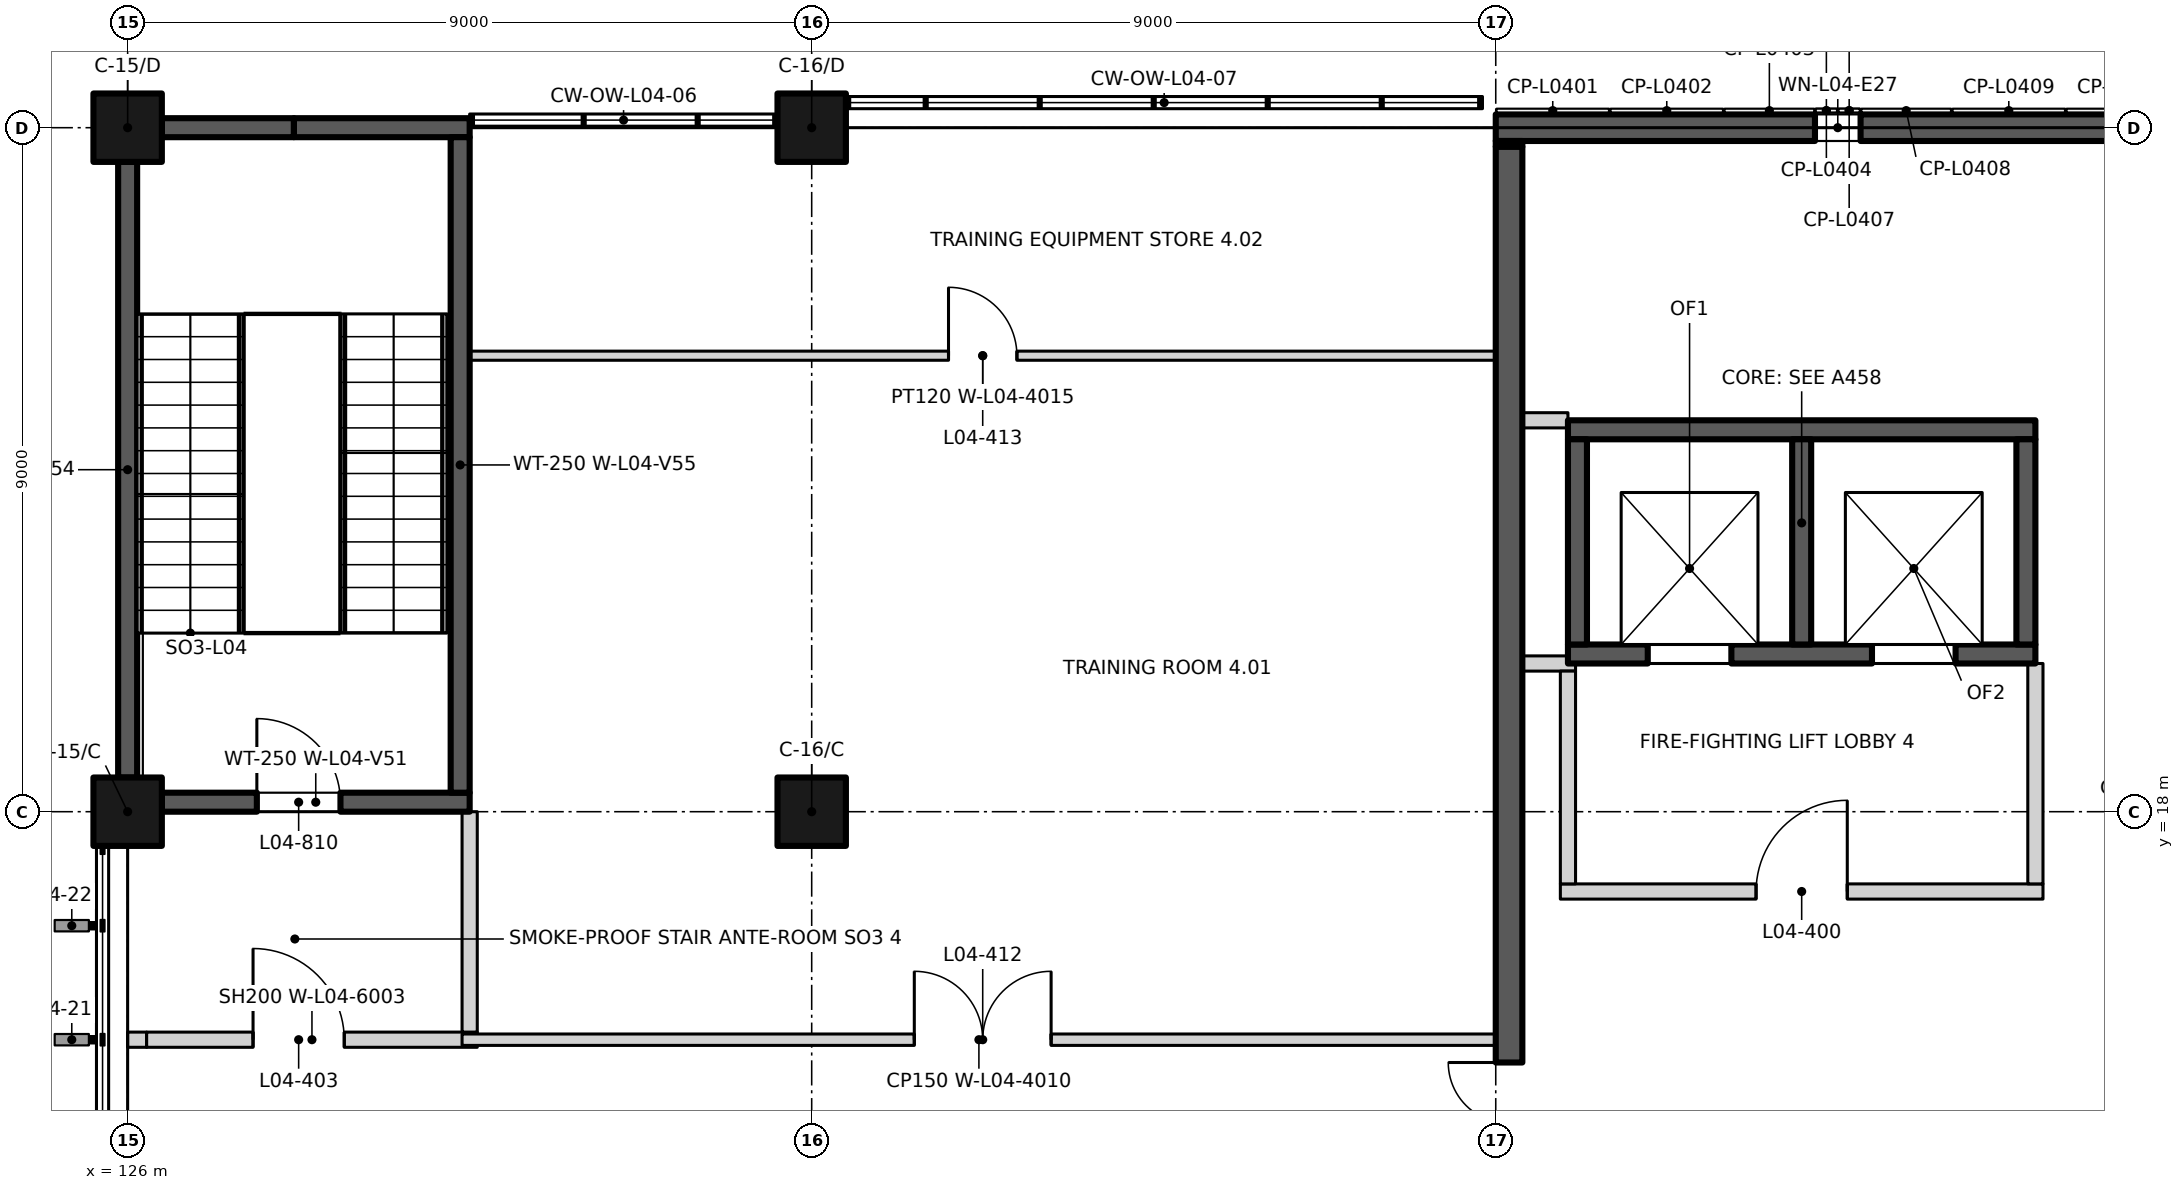
"""IFC4 building model, lengths in metres.
Left out: names, types, materials, properties, quantities, classifications, styles, units other than length and angle.
Written with IfcOpenShell. Run it as: python <this file> out.ifc"""

import sys

from ifc_helpers import new_model, si_unit, direction, frame, frame_2d, origin, origin_2d, place, context, subcontext, project, spatial, rectangle, extrude, element, fill, save


model = new_model("IFC4")
c1 = context("Model", 3, precision=1e-05, world=origin(), true_north=direction((0.0, 1.0)))
c2 = subcontext(c1, "Body", "Model", "MODEL_VIEW")
j1 = project(units=[si_unit("LENGTHUNIT", "METRE"), si_unit("PLANEANGLEUNIT", "RADIAN")], contexts=[c1])
p1 = place(None, origin())
s1 = spatial("IfcSite", under=j1, at=p1, CompositionType="ELEMENT")
p2 = place(p1, origin())
s2 = spatial("IfcBuilding", under=s1, at=p2, CompositionType="ELEMENT")
p3 = place(p2, frame((0.0, 0.0, 19.5)))
s3 = spatial("IfcBuildingStorey", under=s2, at=p3, CompositionType="ELEMENT", Elevation=19.5)
for number, where, z_axis, x_axis in (
    (1, (126.0, 18.0, 0.0), (0.0, 0.0, 1.0), (1.0, 0.0, 0.0)),
    (2, (135.0, 18.0, 0.0), (0.0, 0.0, 1.0), (1.0, 0.0, 0.0)),
    (3, (126.0, 27.0, 0.0), (0.0, 0.0, 1.0), (1.0, 0.0, 0.0)),
    (4, (135.0, 27.0, 0.0), (0.0, 0.0, 1.0), (1.0, 0.0, 0.0)),
):
    element("IfcColumn", number, at=place(p3, frame(where, z_axis=z_axis, x_axis=x_axis)), inside=s3, PredefinedType="COLUMN", context=c2, shape_type="SweptSolid", body=[
        extrude(rectangle(XDim=0.9, YDim=0.9, at=origin_2d()), origin(), (0.0, 0.0, 1.0), 4.5),
    ])
p4 = place(p3, frame((126.45, 18.125, 0.0), z_axis=(0.0, 0.0, 1.0), x_axis=(1.0, 0.0, 0.0)))
e5 = element("IfcWall", 5, at=p4, inside=s3, PredefinedType="SHEAR", context=c2, shape_type="SweptSolid", body=[
    extrude(rectangle(XDim=4.05, YDim=0.25, at=frame_2d((2.025, 0.0))), origin(), (0.0, 0.0, 1.0), 4.5),
])
p5 = place(p4, frame((1.25, 0.0, 0.0)))
e6 = element("IfcOpeningElement", 6, at=p5, cuts=e5, PredefinedType="OPENING", context=c2, shape_type="SweptSolid", body=[
    extrude(rectangle(XDim=1.1, YDim=2.1, at=frame_2d((0.55, 1.05))), frame((0.0, 0.135, 0.0), z_axis=(0.0, -1.0, 0.0), x_axis=(1.0, 0.0, 0.0)), (0.0, 0.0, 1.0), 0.27),
])
p6 = place(p3, frame((126.45, 27.0, 0.0), z_axis=(0.0, 0.0, 1.0), x_axis=(1.0, 0.0, 0.0)))
e7 = element("IfcWall", 7, at=p6, inside=s3, PredefinedType="SHEAR", context=c2, shape_type="SweptSolid", body=[
    extrude(rectangle(XDim=1.738, YDim=0.25, at=frame_2d((0.869, 0.0))), origin(), (0.0, 0.0, 1.0), 4.5),
])
p7 = place(p3, frame((128.188, 27.0, 0.0), z_axis=(0.0, 0.0, 1.0), x_axis=(1.0, 0.0, 0.0)))
e8 = element("IfcWall", 8, at=p7, inside=s3, PredefinedType="SHEAR", context=c2, shape_type="SweptSolid", body=[
    extrude(rectangle(XDim=2.312, YDim=0.25, at=frame_2d((1.156, 0.0))), origin(), (0.0, 0.0, 1.0), 4.5),
])
p8 = place(p3, frame((126.0, 18.45, 0.0), z_axis=(0.0, 0.0, 1.0), x_axis=(0.0, 1.0, 0.0)))
e9 = element("IfcWall", 9, at=p8, inside=s3, PredefinedType="SHEAR", context=c2, shape_type="SweptSolid", body=[
    extrude(rectangle(XDim=8.1, YDim=0.25, at=frame_2d((4.05, 0.0))), origin(), (0.0, 0.0, 1.0), 4.5),
])
p9 = place(p3, frame((130.375, 18.25, 0.0), z_axis=(0.0, 0.0, 1.0), x_axis=(0.0, 1.0, 0.0)))
e10 = element("IfcWall", 10, at=p9, inside=s3, PredefinedType="SHEAR", context=c2, shape_type="SweptSolid", body=[
    extrude(rectangle(XDim=8.625, YDim=0.25, at=frame_2d((4.312, 0.0))), origin(), (0.0, 0.0, 1.0), 4.5),
])
p10 = place(p3, frame((144.95, 20.075, 0.0), z_axis=(0.0, 0.0, 1.0), x_axis=(1.0, 0.0, 0.0)))
e11 = element("IfcWall", 11, at=p10, inside=s3, PredefinedType="SHEAR", context=c2, shape_type="SweptSolid", body=[
    extrude(rectangle(XDim=6.15, YDim=0.25, at=frame_2d((3.075, 0.0))), origin(), (0.0, 0.0, 1.0), 4.5),
])
p11 = place(p10, frame((1.05, 0.0, 0.0)))
e12 = element("IfcOpeningElement", 12, at=p11, cuts=e11, PredefinedType="OPENING", context=c2, shape_type="SweptSolid", body=[
    extrude(rectangle(XDim=1.1, YDim=2.1, at=frame_2d((0.55, 1.05))), frame((0.0, 0.135, 0.0), z_axis=(0.0, -1.0, 0.0), x_axis=(1.0, 0.0, 0.0)), (0.0, 0.0, 1.0), 0.27),
])
p12 = place(p10, frame((4.0, 0.0, 0.0)))
e13 = element("IfcOpeningElement", 13, at=p12, cuts=e11, PredefinedType="OPENING", context=c2, shape_type="SweptSolid", body=[
    extrude(rectangle(XDim=1.1, YDim=2.1, at=frame_2d((0.55, 1.05))), frame((0.0, 0.135, 0.0), z_axis=(0.0, -1.0, 0.0), x_axis=(1.0, 0.0, 0.0)), (0.0, 0.0, 1.0), 0.27),
])
p13 = place(p3, frame((144.95, 23.025, 0.0), z_axis=(0.0, 0.0, 1.0), x_axis=(1.0, 0.0, 0.0)))
e14 = element("IfcWall", 14, at=p13, inside=s3, PredefinedType="SHEAR", context=c2, shape_type="SweptSolid", body=[
    extrude(rectangle(XDim=6.15, YDim=0.25, at=frame_2d((3.075, 0.0))), origin(), (0.0, 0.0, 1.0), 4.5),
])
for number, where, z_axis, x_axis in (
    (15, (145.075, 20.2, 0.0), (0.0, 0.0, 1.0), (0.0, 1.0, 0.0)),
    (16, (148.025, 20.2, 0.0), (0.0, 0.0, 1.0), (0.0, 1.0, 0.0)),
    (17, (150.975, 20.2, 0.0), (0.0, 0.0, 1.0), (0.0, 1.0, 0.0)),
):
    element("IfcWall", number, at=place(p3, frame(where, z_axis=z_axis, x_axis=x_axis)), inside=s3, PredefinedType="SHEAR", context=c2, shape_type="SweptSolid", body=[
        extrude(rectangle(XDim=2.7, YDim=0.25, at=frame_2d((1.35, 0.0))), origin(), (0.0, 0.0, 1.0), 4.5),
    ])
p14 = place(p3, frame((144.0, 27.0, 0.0), z_axis=(0.0, 0.0, 1.0), x_axis=(1.0, 0.0, 0.0)))
e18 = element("IfcWall", 18, at=p14, inside=s3, PredefinedType="SOLIDWALL", context=c2, shape_type="SweptSolid", body=[
    extrude(rectangle(XDim=18.0, YDim=0.35, at=frame_2d((9.0, 0.0))), origin(), (0.0, 0.0, 1.0), 3.6),
])
p15 = place(p14, frame((4.2, 0.0, 0.6)))
e19 = element("IfcOpeningElement", 19, at=p15, cuts=e18, PredefinedType="OPENING", context=c2, shape_type="SweptSolid", body=[
    extrude(rectangle(XDim=0.6, YDim=2.4, at=frame_2d((0.3, 1.2))), frame((0.0, 0.185, 0.0), z_axis=(0.0, -1.0, 0.0), x_axis=(1.0, 0.0, 0.0)), (0.0, 0.0, 1.0), 0.37),
])
p16 = place(p14, frame((13.2, 0.0, 0.6)))
e20 = element("IfcOpeningElement", 20, at=p16, cuts=e18, PredefinedType="OPENING", context=c2, shape_type="SweptSolid", body=[
    extrude(rectangle(XDim=0.6, YDim=2.4, at=frame_2d((0.3, 1.2))), frame((0.0, 0.185, 0.0), z_axis=(0.0, -1.0, 0.0), x_axis=(1.0, 0.0, 0.0)), (0.0, 0.0, 1.0), 0.37),
])
p17 = place(p3, frame((126.0, 15.0, 0.0), z_axis=(0.0, 0.0, 1.0), x_axis=(1.0, 0.0, 0.0)))
e21 = element("IfcWall", 21, at=p17, inside=s3, PredefinedType="PARTITIONING", context=c2, shape_type="SweptSolid", body=[
    extrude(rectangle(XDim=0.25, YDim=0.2, at=frame_2d((0.125, 0.0))), origin(), (0.0, 0.0, 1.0), 3.6),
])
p18 = place(p3, frame((126.25, 15.0, 0.0), z_axis=(0.0, 0.0, 1.0), x_axis=(1.0, 0.0, 0.0)))
e22 = element("IfcWall", 22, at=p18, inside=s3, PredefinedType="PARTITIONING", context=c2, shape_type="SweptSolid", body=[
    extrude(rectangle(XDim=4.35, YDim=0.2, at=frame_2d((2.175, 0.0))), origin(), (0.0, 0.0, 1.0), 4.2),
])
p19 = place(p18, frame((1.4, 0.0, 0.0)))
e23 = element("IfcOpeningElement", 23, at=p19, cuts=e22, PredefinedType="OPENING", context=c2, shape_type="SweptSolid", body=[
    extrude(rectangle(XDim=1.2, YDim=2.1, at=frame_2d((0.6, 1.05))), frame((0.0, 0.11, 0.0), z_axis=(0.0, -1.0, 0.0), x_axis=(1.0, 0.0, 0.0)), (0.0, 0.0, 1.0), 0.22),
])
p20 = place(p3, frame((130.4, 15.0, 0.0), z_axis=(0.0, 0.0, 1.0), x_axis=(1.0, 0.0, 0.0)))
e24 = element("IfcWall", 24, at=p20, inside=s3, PredefinedType="PARTITIONING", context=c2, shape_type="SweptSolid", body=[
    extrude(rectangle(XDim=13.6, YDim=0.15, at=frame_2d((6.8, 0.0))), origin(), (0.0, 0.0, 1.0), 4.2),
])
p21 = place(p20, frame((5.95, 0.0, 0.0)))
e25 = element("IfcOpeningElement", 25, at=p21, cuts=e24, PredefinedType="OPENING", context=c2, shape_type="SweptSolid", body=[
    extrude(rectangle(XDim=1.8, YDim=2.1, at=frame_2d((0.9, 1.05))), frame((0.0, 0.085, 0.0), z_axis=(0.0, -1.0, 0.0), x_axis=(1.0, 0.0, 0.0)), (0.0, 0.0, 1.0), 0.17),
])
p22 = place(p3, frame((144.85, 16.95, 0.0), z_axis=(0.0, 0.0, 1.0), x_axis=(1.0, 0.0, 0.0)))
e26 = element("IfcWall", 26, at=p22, inside=s3, PredefinedType="PARTITIONING", context=c2, shape_type="SweptSolid", body=[
    extrude(rectangle(XDim=6.35, YDim=0.2, at=frame_2d((3.175, 0.0))), origin(), (0.0, 0.0, 1.0), 4.2),
])
p23 = place(p22, frame((2.575, 0.0, 0.0)))
e27 = element("IfcOpeningElement", 27, at=p23, cuts=e26, PredefinedType="OPENING", context=c2, shape_type="SweptSolid", body=[
    extrude(rectangle(XDim=1.2, YDim=2.1, at=frame_2d((0.6, 1.05))), frame((0.0, 0.11, 0.0), z_axis=(0.0, -1.0, 0.0), x_axis=(1.0, 0.0, 0.0)), (0.0, 0.0, 1.0), 0.22),
])
p24 = place(p3, frame((144.35, 19.95, 0.0), z_axis=(0.0, 0.0, 1.0), x_axis=(1.0, 0.0, 0.0)))
e28 = element("IfcWall", 28, at=p24, inside=s3, PredefinedType="PARTITIONING", context=c2, shape_type="SweptSolid", body=[
    extrude(rectangle(XDim=0.7, YDim=0.2, at=frame_2d((0.35, 0.0))), origin(), (0.0, 0.0, 1.0), 4.2),
])
p25 = place(p3, frame((144.35, 23.15, 0.0), z_axis=(0.0, 0.0, 1.0), x_axis=(1.0, 0.0, 0.0)))
e29 = element("IfcWall", 29, at=p25, inside=s3, PredefinedType="PARTITIONING", context=c2, shape_type="SweptSolid", body=[
    extrude(rectangle(XDim=0.6, YDim=0.2, at=frame_2d((0.3, 0.0))), origin(), (0.0, 0.0, 1.0), 4.2),
])
p26 = place(p3, frame((130.5, 24.0, 0.0), z_axis=(0.0, 0.0, 1.0), x_axis=(1.0, 0.0, 0.0)))
e30 = element("IfcWall", 30, at=p26, inside=s3, PredefinedType="PARTITIONING", context=c2, shape_type="SweptSolid", body=[
    extrude(rectangle(XDim=13.5, YDim=0.12, at=frame_2d((6.75, 0.0))), origin(), (0.0, 0.0, 1.0), 4.2),
])
p27 = place(p26, frame((6.3, 0.0, 0.0)))
e31 = element("IfcOpeningElement", 31, at=p27, cuts=e30, PredefinedType="OPENING", context=c2, shape_type="SweptSolid", body=[
    extrude(rectangle(XDim=0.9, YDim=2.1, at=frame_2d((0.45, 1.05))), frame((0.0, 0.07, 0.0), z_axis=(0.0, -1.0, 0.0), x_axis=(1.0, 0.0, 0.0)), (0.0, 0.0, 1.0), 0.14),
])
p28 = place(p3, frame((130.5, 15.1, 0.0), z_axis=(0.0, 0.0, 1.0), x_axis=(0.0, 1.0, 0.0)))
e32 = element("IfcWall", 32, at=p28, inside=s3, PredefinedType="PARTITIONING", context=c2, shape_type="SweptSolid", body=[
    extrude(rectangle(XDim=2.9, YDim=0.2, at=frame_2d((1.45, 0.0))), origin(), (0.0, 0.0, 1.0), 4.2),
])
p29 = place(p3, frame((144.175, 9.35, 0.0), z_axis=(0.0, 0.0, 1.0), x_axis=(0.0, 1.0, 0.0)))
e33 = element("IfcWall", 33, at=p29, inside=s3, PredefinedType="SHEAR", context=c2, shape_type="SweptSolid", body=[
    extrude(rectangle(XDim=17.4, YDim=0.35, at=frame_2d((8.7, 0.0))), origin(), (0.0, 0.0, 1.0), 4.2),
])
p30 = place(p29, frame((3.75, 0.0, 0.0)))
e34 = element("IfcOpeningElement", 34, at=p30, cuts=e33, PredefinedType="OPENING", context=c2, shape_type="SweptSolid", body=[
    extrude(rectangle(XDim=1.6, YDim=2.4, at=frame_2d((0.8, 1.2))), frame((0.0, 0.185, 0.0), z_axis=(0.0, -1.0, 0.0), x_axis=(1.0, 0.0, 0.0)), (0.0, 0.0, 1.0), 0.37),
])
p31 = place(p3, frame((144.175, 26.75, 0.0), z_axis=(0.0, 0.0, 1.0), x_axis=(0.0, 1.0, 0.0)))
e35 = element("IfcWall", 35, at=p31, inside=s3, PredefinedType="SHEAR", context=c2, shape_type="SweptSolid", body=[
    extrude(rectangle(XDim=0.075, YDim=0.35, at=frame_2d((0.038, 0.0))), origin(), (0.0, 0.0, 1.0), 3.6),
])
p32 = place(p3, frame((144.95, 17.05, 0.0), z_axis=(0.0, 0.0, 1.0), x_axis=(0.0, 1.0, 0.0)))
e36 = element("IfcWall", 36, at=p32, inside=s3, PredefinedType="PARTITIONING", context=c2, shape_type="SweptSolid", body=[
    extrude(rectangle(XDim=2.8, YDim=0.2, at=frame_2d((1.4, 0.0))), origin(), (0.0, 0.0, 1.0), 4.2),
])
p33 = place(p3, frame((151.1, 17.05, 0.0), z_axis=(0.0, 0.0, 1.0), x_axis=(0.0, 1.0, 0.0)))
e37 = element("IfcWall", 37, at=p33, inside=s3, PredefinedType="PARTITIONING", context=c2, shape_type="SweptSolid", body=[
    extrude(rectangle(XDim=2.9, YDim=0.2, at=frame_2d((1.45, 0.0))), origin(), (0.0, 0.0, 1.0), 4.2),
])
p34 = place(p5, origin())
e38 = element("IfcDoor", 38, at=p34, inside=s3, OperationType="SINGLE_SWING_LEFT", PredefinedType="DOOR", context=c2, shape_type="SweptSolid", body=[
    extrude(rectangle(XDim=1.1, YDim=2.1, at=frame_2d((0.55, 1.05))), frame((0.0, 0.025, 0.0), z_axis=(0.0, -1.0, 0.0), x_axis=(1.0, 0.0, 0.0)), (0.0, 0.0, 1.0), 0.05),
])
fill(e6, e38)
p35 = place(p11, origin())
e39 = element("IfcDoor", 39, at=p35, inside=s3, OperationType="DOUBLE_DOOR_SLIDING", PredefinedType="DOOR", context=c2, shape_type="SweptSolid", body=[
    extrude(rectangle(XDim=1.1, YDim=2.1, at=frame_2d((0.55, 1.05))), frame((0.0, 0.025, 0.0), z_axis=(0.0, -1.0, 0.0), x_axis=(1.0, 0.0, 0.0)), (0.0, 0.0, 1.0), 0.05),
])
fill(e12, e39)
p36 = place(p12, origin())
e40 = element("IfcDoor", 40, at=p36, inside=s3, OperationType="DOUBLE_DOOR_SLIDING", PredefinedType="DOOR", context=c2, shape_type="SweptSolid", body=[
    extrude(rectangle(XDim=1.1, YDim=2.1, at=frame_2d((0.55, 1.05))), frame((0.0, 0.025, 0.0), z_axis=(0.0, -1.0, 0.0), x_axis=(1.0, 0.0, 0.0)), (0.0, 0.0, 1.0), 0.05),
])
fill(e13, e40)
p37 = place(p15, origin())
e41 = element("IfcWindow", 41, at=p37, inside=s3, PartitioningType="SINGLE_PANEL", PredefinedType="WINDOW", context=c2, shape_type="SweptSolid", body=[
    extrude(rectangle(XDim=0.6, YDim=2.4, at=frame_2d((0.3, 1.2))), frame((0.0, -0.005, 0.0), z_axis=(0.0, -1.0, 0.0), x_axis=(1.0, 0.0, 0.0)), (0.0, 0.0, 1.0), 0.06),
])
fill(e19, e41)
p38 = place(p23, origin())
e42 = element("IfcDoor", 42, at=p38, inside=s3, OperationType="SINGLE_SWING_RIGHT", PredefinedType="DOOR", context=c2, shape_type="SweptSolid", body=[
    extrude(rectangle(XDim=1.2, YDim=2.1, at=frame_2d((0.6, 1.05))), frame((0.0, 0.025, 0.0), z_axis=(0.0, -1.0, 0.0), x_axis=(1.0, 0.0, 0.0)), (0.0, 0.0, 1.0), 0.05),
])
fill(e27, e42)
p39 = place(p19, origin())
e43 = element("IfcDoor", 43, at=p39, inside=s3, OperationType="SINGLE_SWING_LEFT", PredefinedType="DOOR", context=c2, shape_type="SweptSolid", body=[
    extrude(rectangle(XDim=1.2, YDim=2.1, at=frame_2d((0.6, 1.05))), frame((0.0, 0.025, 0.0), z_axis=(0.0, -1.0, 0.0), x_axis=(1.0, 0.0, 0.0)), (0.0, 0.0, 1.0), 0.05),
])
fill(e23, e43)
p40 = place(p30, origin())
e44 = element("IfcDoor", 44, at=p40, inside=s3, OperationType="DOUBLE_DOOR_SINGLE_SWING", PredefinedType="DOOR", context=c2, shape_type="SweptSolid", body=[
    extrude(rectangle(XDim=1.6, YDim=2.4, at=frame_2d((0.8, 1.2))), frame((0.0, 0.025, 0.0), z_axis=(0.0, -1.0, 0.0), x_axis=(1.0, 0.0, 0.0)), (0.0, 0.0, 1.0), 0.05),
])
fill(e34, e44)
p41 = place(p21, origin())
e45 = element("IfcDoor", 45, at=p41, inside=s3, OperationType="DOUBLE_DOOR_SINGLE_SWING", PredefinedType="DOOR", context=c2, shape_type="SweptSolid", body=[
    extrude(rectangle(XDim=1.8, YDim=2.1, at=frame_2d((0.9, 1.05))), frame((0.0, 0.025, 0.0), z_axis=(0.0, -1.0, 0.0), x_axis=(1.0, 0.0, 0.0)), (0.0, 0.0, 1.0), 0.05),
])
fill(e25, e45)
p42 = place(p27, origin())
e46 = element("IfcDoor", 46, at=p42, inside=s3, OperationType="SINGLE_SWING_LEFT", PredefinedType="DOOR", context=c2, shape_type="SweptSolid", body=[
    extrude(rectangle(XDim=0.9, YDim=2.1, at=frame_2d((0.45, 1.05))), frame((0.0, 0.025, 0.0), z_axis=(0.0, -1.0, 0.0), x_axis=(1.0, 0.0, 0.0)), (0.0, 0.0, 1.0), 0.05),
])
fill(e31, e46)
save(model, sys.argv[1])
